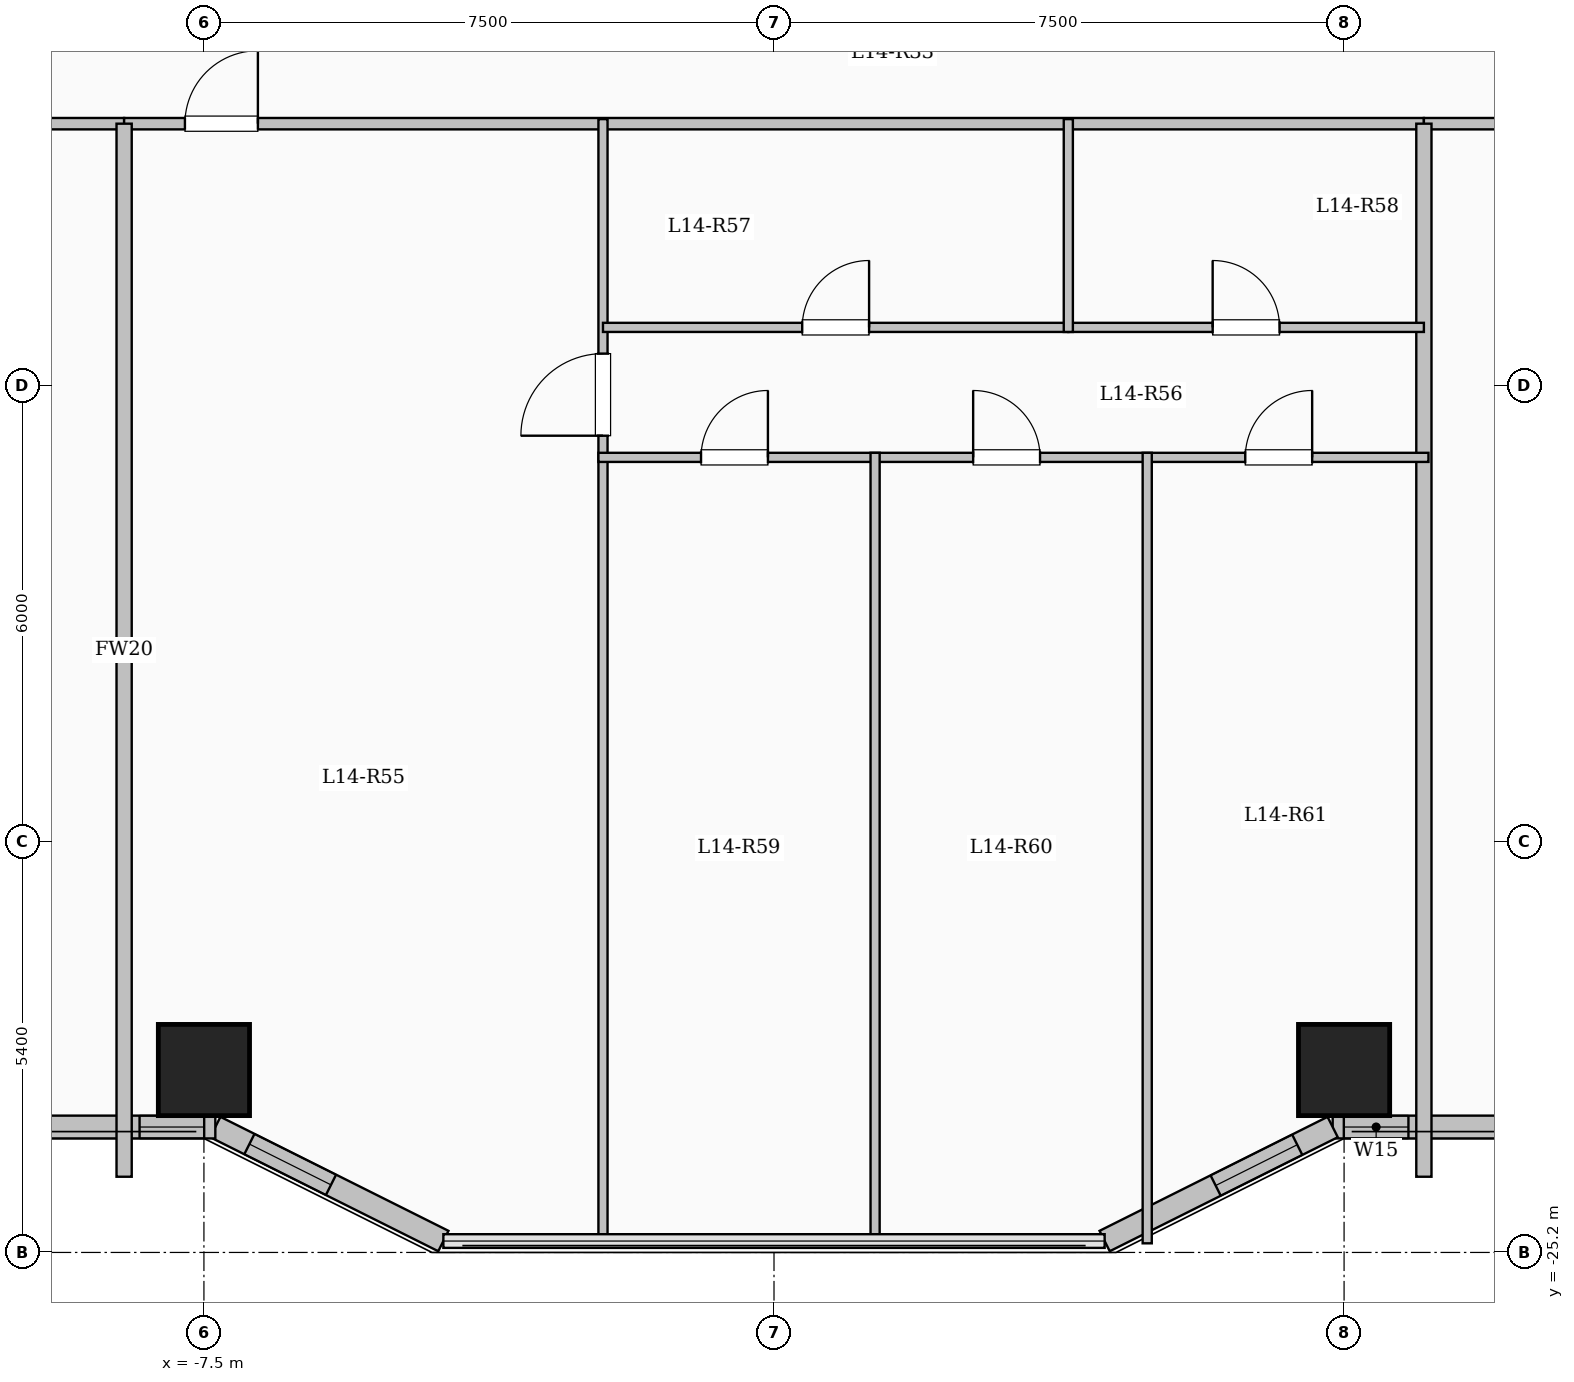
"""IFC4 building model, lengths in metres.
Left out: names, types, materials, properties, quantities, classifications, styles, units other than length and angle.
Written with IfcOpenShell. Run it as: python <this file> out.ifc"""

import sys

from ifc_helpers import new_model, si_unit, direction, frame, frame_2d, origin, origin_2d, place, context, subcontext, project, spatial, rectangle, extrude, element, fill, save


model = new_model("IFC4")
c1 = context("Model", 3, precision=1e-05, world=origin(), true_north=direction((0.0, 1.0)))
c2 = subcontext(c1, "Body", "Model", "MODEL_VIEW")
j1 = project(units=[si_unit("LENGTHUNIT", "METRE"), si_unit("PLANEANGLEUNIT", "RADIAN")], contexts=[c1])
p1 = place(None, origin())
s1 = spatial("IfcSite", under=j1, at=p1, CompositionType="ELEMENT")
p2 = place(p1, origin())
s2 = spatial("IfcBuilding", under=s1, at=p2, CompositionType="ELEMENT")
p3 = place(p2, frame((0.0, 0.0, 54.15)))
s3 = spatial("IfcBuildingStorey", under=s2, at=p3, CompositionType="ELEMENT", Elevation=54.15)
for number, where, z_axis, x_axis in (
    (1, (-7.5, -22.8, 0.0), (0.0, 0.0, 1.0), (1.0, 0.0, 0.0)),
    (2, (7.5, -22.8, 0.0), (0.0, 0.0, 1.0), (1.0, 0.0, 0.0)),
):
    element("IfcColumn", number, at=place(p3, frame(where, z_axis=z_axis, x_axis=x_axis)), inside=s3, PredefinedType="COLUMN", context=c2, shape_type="SweptSolid", body=[
        extrude(rectangle(XDim=1.2, YDim=1.2, at=origin_2d()), origin(), (0.0, 0.0, 1.0), 3.35),
    ])
p4 = place(p3, frame((22.65, -23.55, 0.0), z_axis=(0.0, 0.0, 1.0), x_axis=(-1.0, 0.0, 0.0)))
e3 = element("IfcWall", 3, at=p4, inside=s3, PredefinedType="SOLIDWALL", context=c2, shape_type="SweptSolid", body=[
    extrude(rectangle(XDim=15.3, YDim=0.3, at=frame_2d((7.65, 0.0))), origin(), (0.0, 0.0, 1.0), 3.1),
])
p5 = place(p4, frame((1.007, 0.0, 0.9)))
e4 = element("IfcOpeningElement", 4, at=p5, cuts=e3, PredefinedType="OPENING", context=c2, shape_type="SweptSolid", body=[
    extrude(rectangle(XDim=2.0, YDim=1.7, at=frame_2d((1.0, 0.85))), frame((0.0, 0.16, 0.0), z_axis=(0.0, -1.0, 0.0), x_axis=(1.0, 0.0, 0.0)), (0.0, 0.0, 1.0), 0.32),
])
p6 = place(p4, frame((5.496, 0.0, 0.9)))
e5 = element("IfcOpeningElement", 5, at=p6, cuts=e3, PredefinedType="OPENING", context=c2, shape_type="SweptSolid", body=[
    extrude(rectangle(XDim=2.0, YDim=1.7, at=frame_2d((1.0, 0.85))), frame((0.0, 0.16, 0.0), z_axis=(0.0, -1.0, 0.0), x_axis=(1.0, 0.0, 0.0)), (0.0, 0.0, 1.0), 0.32),
])
p7 = place(p4, frame((10.563, 0.0, 0.9)))
e6 = element("IfcOpeningElement", 6, at=p7, cuts=e3, PredefinedType="OPENING", context=c2, shape_type="SweptSolid", body=[
    extrude(rectangle(XDim=2.0, YDim=1.7, at=frame_2d((1.0, 0.85))), frame((0.0, 0.16, 0.0), z_axis=(0.0, -1.0, 0.0), x_axis=(1.0, 0.0, 0.0)), (0.0, 0.0, 1.0), 0.32),
])
p8 = place(p4, frame((14.303, 0.0, 0.95)))
e7 = element("IfcOpeningElement", 7, at=p8, cuts=e3, PredefinedType="OPENING", context=c2, shape_type="SweptSolid", body=[
    extrude(rectangle(XDim=0.85, YDim=1.5, at=frame_2d((0.425, 0.75))), frame((0.0, 0.16, 0.0), z_axis=(0.0, -1.0, 0.0), x_axis=(1.0, 0.0, 0.0)), (0.0, 0.0, 1.0), 0.32),
])
p9 = place(p3, frame((7.35, -23.55, 0.0), z_axis=(0.0, 0.0, 1.0), x_axis=(-0.894427191, -0.4472135955, 0.0)))
e8 = element("IfcWall", 8, at=p9, inside=s3, PredefinedType="SOLIDWALL", context=c2, shape_type="SweptSolid", body=[
    extrude(rectangle(XDim=3.354, YDim=0.3, at=frame_2d((1.677, 0.0))), origin(), (0.0, 0.0, 1.0), 3.1),
])
p10 = place(p9, frame((0.521, 0.0, 0.95)))
e9 = element("IfcOpeningElement", 9, at=p10, cuts=e8, PredefinedType="OPENING", context=c2, shape_type="SweptSolid", body=[
    extrude(rectangle(XDim=1.2, YDim=1.5, at=frame_2d((0.6, 0.75))), frame((0.0, 0.16, 0.0), z_axis=(0.0, -1.0, 0.0), x_axis=(1.0, 0.0, 0.0)), (0.0, 0.0, 1.0), 0.32),
])
p11 = place(p3, frame((-4.35, -25.05, 0.0), z_axis=(0.0, 0.0, 1.0), x_axis=(-0.894427191, 0.4472135955, 0.0)))
e10 = element("IfcWall", 10, at=p11, inside=s3, PredefinedType="SOLIDWALL", context=c2, shape_type="SweptSolid", body=[
    extrude(rectangle(XDim=3.354, YDim=0.3, at=frame_2d((1.677, 0.0))), origin(), (0.0, 0.0, 1.0), 3.1),
])
p12 = place(p11, frame((1.653, 0.0, 0.95)))
e11 = element("IfcOpeningElement", 11, at=p12, cuts=e10, PredefinedType="OPENING", context=c2, shape_type="SweptSolid", body=[
    extrude(rectangle(XDim=1.2, YDim=1.5, at=frame_2d((0.6, 0.75))), frame((0.0, 0.16, 0.0), z_axis=(0.0, -1.0, 0.0), x_axis=(1.0, 0.0, 0.0)), (0.0, 0.0, 1.0), 0.32),
])
p13 = place(p3, frame((-7.35, -23.55, 0.0), z_axis=(0.0, 0.0, 1.0), x_axis=(-1.0, 0.0, 0.0)))
e12 = element("IfcWall", 12, at=p13, inside=s3, PredefinedType="SOLIDWALL", context=c2, shape_type="SweptSolid", body=[
    extrude(rectangle(XDim=15.3, YDim=0.3, at=frame_2d((7.65, 0.0))), origin(), (0.0, 0.0, 1.0), 3.1),
])
p14 = place(p13, frame((0.147, 0.0, 0.95)))
e13 = element("IfcOpeningElement", 13, at=p14, cuts=e12, PredefinedType="OPENING", context=c2, shape_type="SweptSolid", body=[
    extrude(rectangle(XDim=0.85, YDim=1.5, at=frame_2d((0.425, 0.75))), frame((0.0, 0.16, 0.0), z_axis=(0.0, -1.0, 0.0), x_axis=(1.0, 0.0, 0.0)), (0.0, 0.0, 1.0), 0.32),
])
p15 = place(p13, frame((2.26, 0.0, 0.9)))
e14 = element("IfcOpeningElement", 14, at=p15, cuts=e12, PredefinedType="OPENING", context=c2, shape_type="SweptSolid", body=[
    extrude(rectangle(XDim=1.8, YDim=1.65, at=frame_2d((0.9, 0.825))), frame((0.0, 0.16, 0.0), z_axis=(0.0, -1.0, 0.0), x_axis=(1.0, 0.0, 0.0)), (0.0, 0.0, 1.0), 0.32),
])
p16 = place(p13, frame((6.65, 0.0, 0.9)))
e15 = element("IfcOpeningElement", 15, at=p16, cuts=e12, PredefinedType="OPENING", context=c2, shape_type="SweptSolid", body=[
    extrude(rectangle(XDim=2.0, YDim=1.7, at=frame_2d((1.0, 0.85))), frame((0.0, 0.16, 0.0), z_axis=(0.0, -1.0, 0.0), x_axis=(1.0, 0.0, 0.0)), (0.0, 0.0, 1.0), 0.32),
])
p17 = place(p13, frame((11.717, 0.0, 0.9)))
e16 = element("IfcOpeningElement", 16, at=p17, cuts=e12, PredefinedType="OPENING", context=c2, shape_type="SweptSolid", body=[
    extrude(rectangle(XDim=2.0, YDim=1.7, at=frame_2d((1.0, 0.85))), frame((0.0, 0.16, 0.0), z_axis=(0.0, -1.0, 0.0), x_axis=(1.0, 0.0, 0.0)), (0.0, 0.0, 1.0), 0.32),
])
p18 = place(p3, frame((-22.55, -10.35, 0.0), z_axis=(0.0, 0.0, 1.0), x_axis=(1.0, 0.0, 0.0)))
e17 = element("IfcWall", 17, at=p18, inside=s3, PredefinedType="PARTITIONING", context=c2, shape_type="SweptSolid", body=[
    extrude(rectangle(XDim=14.0, YDim=0.15, at=frame_2d((7.0, 0.0))), origin(), (0.0, 0.0, 1.0), 3.1),
])
p19 = place(p18, frame((2.006, 0.0, 0.0)))
e18 = element("IfcOpeningElement", 18, at=p19, cuts=e17, PredefinedType="OPENING", context=c2, shape_type="SweptSolid", body=[
    extrude(rectangle(XDim=0.95, YDim=2.15, at=frame_2d((0.475, 1.075))), frame((0.0, 0.085, 0.0), z_axis=(0.0, -1.0, 0.0), x_axis=(1.0, 0.0, 0.0)), (0.0, 0.0, 1.0), 0.17),
])
p20 = place(p18, frame((7.058, 0.0, 0.0)))
e19 = element("IfcOpeningElement", 19, at=p20, cuts=e17, PredefinedType="OPENING", context=c2, shape_type="SweptSolid", body=[
    extrude(rectangle(XDim=0.95, YDim=2.15, at=frame_2d((0.475, 1.075))), frame((0.0, 0.085, 0.0), z_axis=(0.0, -1.0, 0.0), x_axis=(1.0, 0.0, 0.0)), (0.0, 0.0, 1.0), 0.17),
])
p21 = place(p18, frame((11.552, 0.0, 0.0)))
e20 = element("IfcOpeningElement", 20, at=p21, cuts=e17, PredefinedType="OPENING", context=c2, shape_type="SweptSolid", body=[
    extrude(rectangle(XDim=0.95, YDim=2.15, at=frame_2d((0.475, 1.075))), frame((0.0, 0.085, 0.0), z_axis=(0.0, -1.0, 0.0), x_axis=(1.0, 0.0, 0.0)), (0.0, 0.0, 1.0), 0.17),
])
p22 = place(p3, frame((-8.55, -10.35, 0.0), z_axis=(0.0, 0.0, 1.0), x_axis=(1.0, 0.0, 0.0)))
e21 = element("IfcWall", 21, at=p22, inside=s3, PredefinedType="PARTITIONING", context=c2, shape_type="SweptSolid", body=[
    extrude(rectangle(XDim=17.1, YDim=0.15, at=frame_2d((8.55, 0.0))), origin(), (0.0, 0.0, 1.0), 3.1),
])
p23 = place(p22, frame((0.8, 0.0, 0.0)))
e22 = element("IfcOpeningElement", 22, at=p23, cuts=e21, PredefinedType="OPENING", context=c2, shape_type="SweptSolid", body=[
    extrude(rectangle(XDim=0.96, YDim=2.15, at=frame_2d((0.48, 1.075))), frame((0.0, 0.085, 0.0), z_axis=(0.0, -1.0, 0.0), x_axis=(1.0, 0.0, 0.0)), (0.0, 0.0, 1.0), 0.17),
])
p24 = place(p3, frame((8.55, -10.35, 0.0), z_axis=(0.0, 0.0, 1.0), x_axis=(1.0, 0.0, 0.0)))
e23 = element("IfcWall", 23, at=p24, inside=s3, PredefinedType="PARTITIONING", context=c2, shape_type="SweptSolid", body=[
    extrude(rectangle(XDim=14.0, YDim=0.15, at=frame_2d((7.0, 0.0))), origin(), (0.0, 0.0, 1.0), 3.1),
])
p25 = place(p24, frame((2.056, 0.0, 0.0)))
e24 = element("IfcOpeningElement", 24, at=p25, cuts=e23, PredefinedType="OPENING", context=c2, shape_type="SweptSolid", body=[
    extrude(rectangle(XDim=0.95, YDim=2.15, at=frame_2d((0.475, 1.075))), frame((0.0, 0.085, 0.0), z_axis=(0.0, -1.0, 0.0), x_axis=(1.0, 0.0, 0.0)), (0.0, 0.0, 1.0), 0.17),
])
p26 = place(p24, frame((7.108, 0.0, 0.0)))
e25 = element("IfcOpeningElement", 25, at=p26, cuts=e23, PredefinedType="OPENING", context=c2, shape_type="SweptSolid", body=[
    extrude(rectangle(XDim=0.95, YDim=2.15, at=frame_2d((0.475, 1.075))), frame((0.0, 0.085, 0.0), z_axis=(0.0, -1.0, 0.0), x_axis=(1.0, 0.0, 0.0)), (0.0, 0.0, 1.0), 0.17),
])
p27 = place(p24, frame((11.602, 0.0, 0.0)))
e26 = element("IfcOpeningElement", 26, at=p27, cuts=e23, PredefinedType="OPENING", context=c2, shape_type="SweptSolid", body=[
    extrude(rectangle(XDim=0.95, YDim=2.15, at=frame_2d((0.475, 1.075))), frame((0.0, 0.085, 0.0), z_axis=(0.0, -1.0, 0.0), x_axis=(1.0, 0.0, 0.0)), (0.0, 0.0, 1.0), 0.17),
])
for number, where, z_axis, x_axis in (
    (27, (-8.55, -24.204, 0.0), (0.0, 0.0, 1.0), (0.0, 1.0, 0.0)),
    (28, (8.55, -24.204, 0.0), (0.0, 0.0, 1.0), (0.0, 1.0, 0.0)),
):
    element("IfcWall", number, at=place(p3, frame(where, z_axis=z_axis, x_axis=x_axis)), inside=s3, PredefinedType="SOLIDWALL", context=c2, shape_type="SweptSolid", body=[
        extrude(rectangle(XDim=13.854, YDim=0.2, at=frame_2d((6.927, 0.0))), origin(), (0.0, 0.0, 1.0), 3.1),
    ])
p28 = place(p3, frame((-2.25, -25.08, 0.0), z_axis=(0.0, 0.0, 1.0), x_axis=(0.0, 1.0, 0.0)))
e29 = element("IfcWall", 29, at=p28, inside=s3, PredefinedType="PARTITIONING", context=c2, shape_type="SweptSolid", body=[
    extrude(rectangle(XDim=14.79, YDim=0.12, at=frame_2d((7.395, 0.0))), origin(), (0.0, 0.0, 1.0), 3.1),
])
p29 = place(p28, frame((10.625, 0.0, 0.0)))
e30 = element("IfcOpeningElement", 30, at=p29, cuts=e29, PredefinedType="OPENING", context=c2, shape_type="SweptSolid", body=[
    extrude(rectangle(XDim=1.08, YDim=2.15, at=frame_2d((0.54, 1.075))), frame((0.0, 0.07, 0.0), z_axis=(0.0, -1.0, 0.0), x_axis=(1.0, 0.0, 0.0)), (0.0, 0.0, 1.0), 0.14),
])
p30 = place(p3, frame((-2.25, -13.03, 0.0), z_axis=(0.0, 0.0, 1.0), x_axis=(1.0, 0.0, 0.0)))
e31 = element("IfcWall", 31, at=p30, inside=s3, PredefinedType="PARTITIONING", context=c2, shape_type="SweptSolid", body=[
    extrude(rectangle(XDim=6.122, YDim=0.12, at=frame_2d((3.061, 0.0))), origin(), (0.0, 0.0, 1.0), 2.585),
])
p31 = place(p30, frame((2.621, 0.0, 0.0)))
e32 = element("IfcOpeningElement", 32, at=p31, cuts=e31, PredefinedType="OPENING", context=c2, shape_type="SweptSolid", body=[
    extrude(rectangle(XDim=0.88, YDim=2.1, at=frame_2d((0.44, 1.05))), frame((0.0, 0.07, 0.0), z_axis=(0.0, -1.0, 0.0), x_axis=(1.0, 0.0, 0.0)), (0.0, 0.0, 1.0), 0.14),
])
p32 = place(p3, frame((3.872, -13.03, 0.0), z_axis=(0.0, 0.0, 1.0), x_axis=(1.0, 0.0, 0.0)))
e33 = element("IfcWall", 33, at=p32, inside=s3, PredefinedType="PARTITIONING", context=c2, shape_type="SweptSolid", body=[
    extrude(rectangle(XDim=4.678, YDim=0.12, at=frame_2d((2.339, 0.0))), origin(), (0.0, 0.0, 1.0), 2.585),
])
p33 = place(p32, frame((1.899, 0.0, 0.0)))
e34 = element("IfcOpeningElement", 34, at=p33, cuts=e33, PredefinedType="OPENING", context=c2, shape_type="SweptSolid", body=[
    extrude(rectangle(XDim=0.88, YDim=2.1, at=frame_2d((0.44, 1.05))), frame((0.0, 0.07, 0.0), z_axis=(0.0, -1.0, 0.0), x_axis=(1.0, 0.0, 0.0)), (0.0, 0.0, 1.0), 0.14),
])
p34 = place(p3, frame((-2.31, -14.74, 0.0), z_axis=(0.0, 0.0, 1.0), x_axis=(1.0, 0.0, 0.0)))
e35 = element("IfcWall", 35, at=p34, inside=s3, PredefinedType="PARTITIONING", context=c2, shape_type="SweptSolid", body=[
    extrude(rectangle(XDim=10.92, YDim=0.12, at=frame_2d((5.46, 0.0))), origin(), (0.0, 0.0, 1.0), 2.585),
])
p35 = place(p34, frame((1.35, 0.0, 0.0)))
e36 = element("IfcOpeningElement", 36, at=p35, cuts=e35, PredefinedType="OPENING", context=c2, shape_type="SweptSolid", body=[
    extrude(rectangle(XDim=0.88, YDim=2.1, at=frame_2d((0.44, 1.05))), frame((0.0, 0.07, 0.0), z_axis=(0.0, -1.0, 0.0), x_axis=(1.0, 0.0, 0.0)), (0.0, 0.0, 1.0), 0.14),
])
p36 = place(p34, frame((4.93, 0.0, 0.0)))
e37 = element("IfcOpeningElement", 37, at=p36, cuts=e35, PredefinedType="OPENING", context=c2, shape_type="SweptSolid", body=[
    extrude(rectangle(XDim=0.88, YDim=2.1, at=frame_2d((0.44, 1.05))), frame((0.0, 0.07, 0.0), z_axis=(0.0, -1.0, 0.0), x_axis=(1.0, 0.0, 0.0)), (0.0, 0.0, 1.0), 0.14),
])
p37 = place(p34, frame((8.51, 0.0, 0.0)))
e38 = element("IfcOpeningElement", 38, at=p37, cuts=e35, PredefinedType="OPENING", context=c2, shape_type="SweptSolid", body=[
    extrude(rectangle(XDim=0.88, YDim=2.1, at=frame_2d((0.44, 1.05))), frame((0.0, 0.07, 0.0), z_axis=(0.0, -1.0, 0.0), x_axis=(1.0, 0.0, 0.0)), (0.0, 0.0, 1.0), 0.14),
])
p38 = place(p3, frame((3.872, -13.09, 0.0), z_axis=(0.0, 0.0, 1.0), x_axis=(0.0, 1.0, 0.0)))
e39 = element("IfcWall", 39, at=p38, inside=s3, PredefinedType="PARTITIONING", context=c2, shape_type="SweptSolid", body=[
    extrude(rectangle(XDim=2.8, YDim=0.12, at=frame_2d((1.4, 0.0))), origin(), (0.0, 0.0, 1.0), 3.1),
])
for number, where, z_axis, x_axis in (
    (40, (1.33, -25.08, 0.0), (0.0, 0.0, 1.0), (0.0, 1.0, 0.0)),
    (41, (4.91, -25.08, 0.0), (0.0, 0.0, 1.0), (0.0, 1.0, 0.0)),
):
    element("IfcWall", number, at=place(p3, frame(where, z_axis=z_axis, x_axis=x_axis)), inside=s3, PredefinedType="PARTITIONING", context=c2, shape_type="SweptSolid", body=[
        extrude(rectangle(XDim=10.4, YDim=0.12, at=frame_2d((5.2, 0.0))), origin(), (0.0, 0.0, 1.0), 3.1),
    ])
p39 = place(p8, origin())
e42 = element("IfcWindow", 42, at=p39, inside=s3, PartitioningType="SINGLE_PANEL", PredefinedType="WINDOW", context=c2, shape_type="SweptSolid", body=[
    extrude(rectangle(XDim=0.85, YDim=1.5, at=frame_2d((0.425, 0.75))), frame((0.0, 0.03, 0.0), z_axis=(0.0, -1.0, 0.0), x_axis=(1.0, 0.0, 0.0)), (0.0, 0.0, 1.0), 0.06),
])
fill(e7, e42)
p40 = place(p10, origin())
e43 = element("IfcWindow", 43, at=p40, inside=s3, PartitioningType="SINGLE_PANEL", PredefinedType="WINDOW", context=c2, shape_type="SweptSolid", body=[
    extrude(rectangle(XDim=1.2, YDim=1.5, at=frame_2d((0.6, 0.75))), frame((0.0, 0.03, 0.0), z_axis=(0.0, -1.0, 0.0), x_axis=(1.0, 0.0, 0.0)), (0.0, 0.0, 1.0), 0.06),
])
fill(e9, e43)
p41 = place(p12, origin())
e44 = element("IfcWindow", 44, at=p41, inside=s3, PartitioningType="SINGLE_PANEL", PredefinedType="WINDOW", context=c2, shape_type="SweptSolid", body=[
    extrude(rectangle(XDim=1.2, YDim=1.5, at=frame_2d((0.6, 0.75))), frame((0.0, 0.03, 0.0), z_axis=(0.0, -1.0, 0.0), x_axis=(1.0, 0.0, 0.0)), (0.0, 0.0, 1.0), 0.06),
])
fill(e11, e44)
p42 = place(p14, origin())
e45 = element("IfcWindow", 45, at=p42, inside=s3, PartitioningType="SINGLE_PANEL", PredefinedType="WINDOW", context=c2, shape_type="SweptSolid", body=[
    extrude(rectangle(XDim=0.85, YDim=1.5, at=frame_2d((0.425, 0.75))), frame((0.0, 0.03, 0.0), z_axis=(0.0, -1.0, 0.0), x_axis=(1.0, 0.0, 0.0)), (0.0, 0.0, 1.0), 0.06),
])
fill(e13, e45)
p43 = place(p23, origin())
e46 = element("IfcDoor", 46, at=p43, inside=s3, OperationType="SINGLE_SWING_RIGHT", PredefinedType="DOOR", context=c2, shape_type="SweptSolid", body=[
    extrude(rectangle(XDim=0.96, YDim=2.15, at=frame_2d((0.48, 1.075))), frame((0.0, 0.025, 0.0), z_axis=(0.0, -1.0, 0.0), x_axis=(1.0, 0.0, 0.0)), (0.0, 0.0, 1.0), 0.05),
])
fill(e22, e46)
p44 = place(p29, origin())
e47 = element("IfcDoor", 47, at=p44, inside=s3, OperationType="SINGLE_SWING_LEFT", PredefinedType="DOOR", context=c2, shape_type="SweptSolid", body=[
    extrude(rectangle(XDim=1.08, YDim=2.15, at=frame_2d((0.54, 1.075))), frame((0.0, 0.025, 0.0), z_axis=(0.0, -1.0, 0.0), x_axis=(1.0, 0.0, 0.0)), (0.0, 0.0, 1.0), 0.05),
])
fill(e30, e47)
p45 = place(p31, origin())
e48 = element("IfcDoor", 48, at=p45, inside=s3, OperationType="SINGLE_SWING_RIGHT", PredefinedType="DOOR", context=c2, shape_type="SweptSolid", body=[
    extrude(rectangle(XDim=0.88, YDim=2.1, at=frame_2d((0.44, 1.05))), frame((0.0, 0.025, 0.0), z_axis=(0.0, -1.0, 0.0), x_axis=(1.0, 0.0, 0.0)), (0.0, 0.0, 1.0), 0.05),
])
fill(e32, e48)
p46 = place(p33, origin())
e49 = element("IfcDoor", 49, at=p46, inside=s3, OperationType="SINGLE_SWING_LEFT", PredefinedType="DOOR", context=c2, shape_type="SweptSolid", body=[
    extrude(rectangle(XDim=0.88, YDim=2.1, at=frame_2d((0.44, 1.05))), frame((0.0, 0.025, 0.0), z_axis=(0.0, -1.0, 0.0), x_axis=(1.0, 0.0, 0.0)), (0.0, 0.0, 1.0), 0.05),
])
fill(e34, e49)
p47 = place(p35, origin())
e50 = element("IfcDoor", 50, at=p47, inside=s3, OperationType="SINGLE_SWING_RIGHT", PredefinedType="DOOR", context=c2, shape_type="SweptSolid", body=[
    extrude(rectangle(XDim=0.88, YDim=2.1, at=frame_2d((0.44, 1.05))), frame((0.0, 0.025, 0.0), z_axis=(0.0, -1.0, 0.0), x_axis=(1.0, 0.0, 0.0)), (0.0, 0.0, 1.0), 0.05),
])
fill(e36, e50)
p48 = place(p36, origin())
e51 = element("IfcDoor", 51, at=p48, inside=s3, OperationType="SINGLE_SWING_LEFT", PredefinedType="DOOR", context=c2, shape_type="SweptSolid", body=[
    extrude(rectangle(XDim=0.88, YDim=2.1, at=frame_2d((0.44, 1.05))), frame((0.0, 0.025, 0.0), z_axis=(0.0, -1.0, 0.0), x_axis=(1.0, 0.0, 0.0)), (0.0, 0.0, 1.0), 0.05),
])
fill(e37, e51)
p49 = place(p37, origin())
e52 = element("IfcDoor", 52, at=p49, inside=s3, OperationType="SINGLE_SWING_RIGHT", PredefinedType="DOOR", context=c2, shape_type="SweptSolid", body=[
    extrude(rectangle(XDim=0.88, YDim=2.1, at=frame_2d((0.44, 1.05))), frame((0.0, 0.025, 0.0), z_axis=(0.0, -1.0, 0.0), x_axis=(1.0, 0.0, 0.0)), (0.0, 0.0, 1.0), 0.05),
])
fill(e38, e52)
save(model, sys.argv[1])
